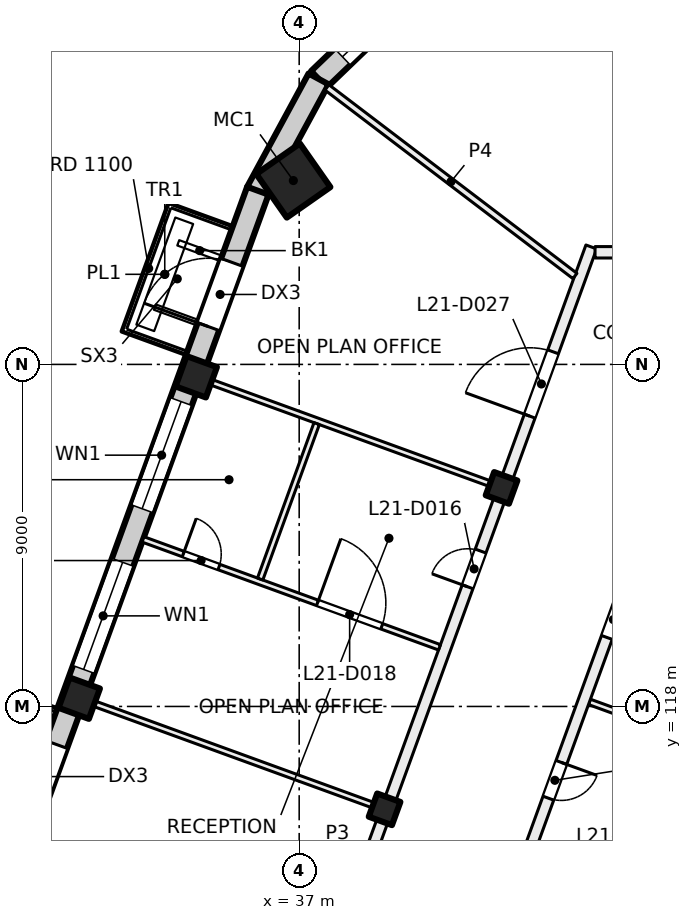
"""IFC4 building model, lengths in metres.
Left out: names, types, materials, properties, quantities, classifications, styles, units other than length and angle.
Written with IfcOpenShell. Run it as: python <this file> out.ifc"""

import sys

from ifc_helpers import new_model, si_unit, direction, frame, frame_2d, origin, origin_2d, place, context, subcontext, project, spatial, rectangle, hollow_rectangle, extrude, element, fill, save


model = new_model("IFC4")
c1 = context("Model", 3, precision=1e-05, world=origin(), true_north=direction((0.0, 1.0)))
c2 = subcontext(c1, "Body", "Model", "MODEL_VIEW")
j1 = project(units=[si_unit("LENGTHUNIT", "METRE"), si_unit("PLANEANGLEUNIT", "RADIAN")], contexts=[c1])
p1 = place(None, origin())
s1 = spatial("IfcSite", under=j1, at=p1, CompositionType="ELEMENT")
p2 = place(p1, origin())
s2 = spatial("IfcBuilding", under=s1, at=p2, CompositionType="ELEMENT")
p3 = place(p2, frame((0.0, 0.0, 93.0)))
s3 = spatial("IfcBuildingStorey", under=s2, at=p3, CompositionType="ELEMENT", Elevation=93.0)
p4 = place(p3, frame((36.846, 131.838, 0.0), z_axis=(0.0, 0.0, 1.0), x_axis=(0.573576436351, -0.819152044289, 0.0)))
e1 = element("IfcColumn", 1, at=p4, inside=s3, PredefinedType="COLUMN", context=c2, shape_type="SweptSolid", body=[
    extrude(hollow_rectangle(XDim=1.4, YDim=1.4, WallThickness=0.04, at=origin_2d()), origin(), (0.0, 0.0, 1.0), 4.0),
])
for number, where, z_axis, x_axis in (
    (2, (42.325, 123.751, 0.0), (0.0, 0.0, 1.0), (-0.342, -0.94, 0.0)),
    (3, (39.247, 115.293, 0.0), (0.0, 0.0, 1.0), (-0.342, -0.94, 0.0)),
):
    element("IfcColumn", number, at=place(p3, frame(where, z_axis=z_axis, x_axis=x_axis)), inside=s3, PredefinedType="COLUMN", context=c2, shape_type="SweptSolid", body=[
        extrude(rectangle(XDim=0.65, YDim=0.65, at=origin_2d()), origin(), (0.0, 0.0, 1.0), 4.0),
    ])
for number, where, z_axis, x_axis in (
    (4, (34.291, 126.675, 0.0), (0.0, 0.0, 1.0), (-0.342, -0.94, 0.0)),
    (5, (31.212, 118.218, 0.0), (0.0, 0.0, 1.0), (-0.342, -0.94, 0.0)),
):
    element("IfcColumn", number, at=place(p3, frame(where, z_axis=z_axis, x_axis=x_axis)), inside=s3, PredefinedType="COLUMN", context=c2, shape_type="SweptSolid", body=[
        extrude(rectangle(XDim=0.85, YDim=0.85, at=origin_2d()), origin(), (0.0, 0.0, 1.0), 4.0),
    ])
p5 = place(p3, frame((37.52, 134.501, 0.0), z_axis=(0.0, 0.0, 1.0), x_axis=(0.72115684486, 0.692771827596, 0.0)))
e6 = element("IfcWall", 6, at=p5, inside=s3, PredefinedType="SOLIDWALL", context=c2, shape_type="SweptSolid", body=[
    extrude(rectangle(XDim=3.303, YDim=0.6, at=frame_2d((1.651, 0.0))), origin(), (0.0, 0.0, 1.0), 3.625),
])
p6 = place(p5, frame((0.856, 0.0, 0.9)))
e7 = element("IfcOpeningElement", 7, at=p6, cuts=e6, PredefinedType="OPENING", context=c2, shape_type="SweptSolid", body=[
    extrude(rectangle(XDim=1.5, YDim=2.4, at=frame_2d((0.75, 1.2))), frame((0.0, 0.31, 0.0), z_axis=(0.0, -1.0, 0.0), x_axis=(1.0, 0.0, 0.0)), (0.0, 0.0, 1.0), 0.62),
])
p7 = place(p3, frame((35.895, 131.53, 0.0), z_axis=(0.0, 0.0, 1.0), x_axis=(0.476531180538, 0.879157570618, 0.0)))
e8 = element("IfcWall", 8, at=p7, inside=s3, PredefinedType="SOLIDWALL", context=c2, shape_type="SweptSolid", body=[
    extrude(rectangle(XDim=3.393, YDim=0.6, at=frame_2d((1.696, 0.0))), origin(), (0.0, 0.0, 1.0), 3.625),
])
p8 = place(p3, frame((24.666, 100.669, 0.0), z_axis=(0.0, 0.0, 1.0), x_axis=(0.34201964167, 0.939692803373, 0.0)))
e9 = element("IfcWall", 9, at=p8, inside=s3, PredefinedType="SOLIDWALL", context=c2, shape_type="SweptSolid", body=[
    extrude(rectangle(XDim=32.884, YDim=0.6, at=frame_2d((16.442, 0.0))), origin(), (0.0, 0.0, 1.0), 3.625),
])
p9 = place(p8, frame((1.48, 0.0, 0.9)))
e10 = element("IfcOpeningElement", 10, at=p9, cuts=e9, PredefinedType="OPENING", context=c2, shape_type="SweptSolid", body=[
    extrude(rectangle(XDim=3.0, YDim=2.4, at=frame_2d((1.5, 1.2))), frame((0.0, 0.31, 0.0), z_axis=(0.0, -1.0, 0.0), x_axis=(1.0, 0.0, 0.0)), (0.0, 0.0, 1.0), 0.62),
])
p10 = place(p8, frame((5.98, 0.0, 0.9)))
e11 = element("IfcOpeningElement", 11, at=p10, cuts=e9, PredefinedType="OPENING", context=c2, shape_type="SweptSolid", body=[
    extrude(rectangle(XDim=3.0, YDim=2.4, at=frame_2d((1.5, 1.2))), frame((0.0, 0.31, 0.0), z_axis=(0.0, -1.0, 0.0), x_axis=(1.0, 0.0, 0.0)), (0.0, 0.0, 1.0), 0.62),
])
p11 = place(p8, frame((10.48, 0.0, 0.9)))
e12 = element("IfcOpeningElement", 12, at=p11, cuts=e9, PredefinedType="OPENING", context=c2, shape_type="SweptSolid", body=[
    extrude(rectangle(XDim=3.0, YDim=2.4, at=frame_2d((1.5, 1.2))), frame((0.0, 0.31, 0.0), z_axis=(0.0, -1.0, 0.0), x_axis=(1.0, 0.0, 0.0)), (0.0, 0.0, 1.0), 0.62),
])
p12 = place(p8, frame((15.58, 0.0, 0.0)))
e13 = element("IfcOpeningElement", 13, at=p12, cuts=e9, PredefinedType="OPENING", context=c2, shape_type="SweptSolid", body=[
    extrude(rectangle(XDim=1.8, YDim=2.4, at=frame_2d((0.9, 1.2))), frame((0.0, 0.31, 0.0), z_axis=(0.0, -1.0, 0.0), x_axis=(1.0, 0.0, 0.0)), (0.0, 0.0, 1.0), 0.62),
])
p13 = place(p8, frame((19.48, 0.0, 0.9)))
e14 = element("IfcOpeningElement", 14, at=p13, cuts=e9, PredefinedType="OPENING", context=c2, shape_type="SweptSolid", body=[
    extrude(rectangle(XDim=3.0, YDim=2.4, at=frame_2d((1.5, 1.2))), frame((0.0, 0.31, 0.0), z_axis=(0.0, -1.0, 0.0), x_axis=(1.0, 0.0, 0.0)), (0.0, 0.0, 1.0), 0.62),
])
p14 = place(p8, frame((23.98, 0.0, 0.9)))
e15 = element("IfcOpeningElement", 15, at=p14, cuts=e9, PredefinedType="OPENING", context=c2, shape_type="SweptSolid", body=[
    extrude(rectangle(XDim=3.0, YDim=2.4, at=frame_2d((1.5, 1.2))), frame((0.0, 0.31, 0.0), z_axis=(0.0, -1.0, 0.0), x_axis=(1.0, 0.0, 0.0)), (0.0, 0.0, 1.0), 0.62),
])
p15 = place(p8, frame((29.08, 0.0, 0.0)))
e16 = element("IfcOpeningElement", 16, at=p15, cuts=e9, PredefinedType="OPENING", context=c2, shape_type="SweptSolid", body=[
    extrude(rectangle(XDim=1.8, YDim=2.4, at=frame_2d((0.9, 1.2))), frame((0.0, 0.31, 0.0), z_axis=(0.0, -1.0, 0.0), x_axis=(1.0, 0.0, 0.0)), (0.0, 0.0, 1.0), 0.62),
])
p16 = place(p3, frame((31.353, 118.166, 0.0), z_axis=(0.0, 0.0, 1.0), x_axis=(0.939687752599, -0.342033518263, 0.0)))
e17 = element("IfcWall", 17, at=p16, inside=s3, PredefinedType="PARTITIONING", context=c2, shape_type="SweptSolid", body=[
    extrude(rectangle(XDim=8.301, YDim=0.15, at=frame_2d((4.15, 0.0))), origin(), (0.0, 0.0, 1.0), 3.625),
])
p17 = place(p3, frame((32.881, 97.657, 0.0), z_axis=(0.0, 0.0, 1.0), x_axis=(0.342017360004, 0.939693633828, 0.0)))
e18 = element("IfcWall", 18, at=p17, inside=s3, PredefinedType="PARTITIONING", context=c2, shape_type="SweptSolid", body=[
    extrude(rectangle(XDim=34.516, YDim=0.3, at=frame_2d((17.258, 0.0))), origin(), (0.0, 0.0, 1.0), 3.625),
])
p18 = place(p17, frame((7.475, 0.0, 0.0)))
e19 = element("IfcOpeningElement", 19, at=p18, cuts=e18, PredefinedType="OPENING", context=c2, shape_type="SweptSolid", body=[
    extrude(rectangle(XDim=1.8, YDim=2.1, at=frame_2d((0.9, 1.05))), frame((0.0, 0.16, 0.0), z_axis=(0.0, -1.0, 0.0), x_axis=(1.0, 0.0, 0.0)), (0.0, 0.0, 1.0), 0.32),
])
p19 = place(p17, frame((25.0, 0.0, 0.0)))
e20 = element("IfcOpeningElement", 20, at=p19, cuts=e18, PredefinedType="OPENING", context=c2, shape_type="SweptSolid", body=[
    extrude(rectangle(XDim=1.0, YDim=2.1, at=frame_2d((0.5, 1.05))), frame((0.0, 0.16, 0.0), z_axis=(0.0, -1.0, 0.0), x_axis=(1.0, 0.0, 0.0)), (0.0, 0.0, 1.0), 0.32),
])
p20 = place(p17, frame((29.779, 0.0, 0.0)))
e21 = element("IfcOpeningElement", 21, at=p20, cuts=e18, PredefinedType="OPENING", context=c2, shape_type="SweptSolid", body=[
    extrude(rectangle(XDim=1.8, YDim=2.1, at=frame_2d((0.9, 1.05))), frame((0.0, 0.16, 0.0), z_axis=(0.0, -1.0, 0.0), x_axis=(1.0, 0.0, 0.0)), (0.0, 0.0, 1.0), 0.32),
])
p21 = place(p3, frame((32.892, 122.395, 0.0), z_axis=(0.0, 0.0, 1.0), x_axis=(0.939684311623, -0.3420429717, 0.0)))
e22 = element("IfcWall", 22, at=p21, inside=s3, PredefinedType="PARTITIONING", context=c2, shape_type="SweptSolid", body=[
    extrude(rectangle(XDim=8.301, YDim=0.15, at=frame_2d((4.15, 0.0))), origin(), (0.0, 0.0, 1.0), 3.625),
])
p22 = place(p21, frame((1.125, 0.0, 0.0)))
e23 = element("IfcOpeningElement", 23, at=p22, cuts=e22, PredefinedType="OPENING", context=c2, shape_type="SweptSolid", body=[
    extrude(rectangle(XDim=1.0, YDim=2.1, at=frame_2d((0.5, 1.05))), frame((0.0, 0.085, 0.0), z_axis=(0.0, -1.0, 0.0), x_axis=(1.0, 0.0, 0.0)), (0.0, 0.0, 1.0), 0.17),
])
p23 = place(p21, frame((4.884, 0.0, 0.0)))
e24 = element("IfcOpeningElement", 24, at=p23, cuts=e22, PredefinedType="OPENING", context=c2, shape_type="SweptSolid", body=[
    extrude(rectangle(XDim=1.8, YDim=2.1, at=frame_2d((0.9, 1.05))), frame((0.0, 0.085, 0.0), z_axis=(0.0, -1.0, 0.0), x_axis=(1.0, 0.0, 0.0)), (0.0, 0.0, 1.0), 0.17),
])
p24 = place(p3, frame((34.431, 126.624, 0.0), z_axis=(0.0, 0.0, 1.0), x_axis=(0.939687752599, -0.342033518263, 0.0)))
e25 = element("IfcWall", 25, at=p24, inside=s3, PredefinedType="PARTITIONING", context=c2, shape_type="SweptSolid", body=[
    extrude(rectangle(XDim=8.301, YDim=0.15, at=frame_2d((4.15, 0.0))), origin(), (0.0, 0.0, 1.0), 3.625),
])
p25 = place(p3, frame((37.46, 125.442, 0.0), z_axis=(0.0, 0.0, 1.0), x_axis=(-0.341783611499, -0.939778677621, 0.0)))
e26 = element("IfcWall", 26, at=p25, inside=s3, PredefinedType="PARTITIONING", context=c2, shape_type="SweptSolid", body=[
    extrude(rectangle(XDim=4.351, YDim=0.15, at=frame_2d((2.175, 0.0))), origin(), (0.0, 0.0, 1.0), 3.625),
])
p26 = place(p3, frame((44.256, 129.327, 0.0), z_axis=(0.0, 0.0, 1.0), x_axis=(-0.796040504107, 0.605243352563, 0.0)))
e27 = element("IfcWall", 27, at=p26, inside=s3, PredefinedType="PARTITIONING", context=c2, shape_type="SweptSolid", body=[
    extrude(rectangle(XDim=8.197, YDim=0.175, at=frame_2d((4.099, 0.0))), origin(), (0.0, 0.0, 1.0), 3.625),
])
p27 = place(p3, frame((44.639, 118.12, 0.0), z_axis=(0.0, 0.0, 1.0), x_axis=(0.939669707102, -0.342083091593, 0.0)))
e28 = element("IfcWall", 28, at=p27, inside=s3, PredefinedType="PARTITIONING", context=c2, shape_type="SweptSolid", body=[
    extrude(rectangle(XDim=8.589, YDim=0.15, at=frame_2d((4.295, 0.0))), origin(), (0.0, 0.0, 1.0), 3.625),
])
p28 = place(p3, frame((44.785, 129.95, 0.0), z_axis=(0.0, 0.0, 1.0), x_axis=(1.0, 0.0, 0.0)))
e29 = element("IfcWall", 29, at=p28, inside=s3, PredefinedType="PARTITIONING", context=c2, shape_type="SweptSolid", body=[
    extrude(rectangle(XDim=19.115, YDim=0.3, at=frame_2d((9.558, 0.0))), origin(), (0.0, 0.0, 1.0), 3.625),
])
p29 = place(p28, frame((15.615, 0.0, 0.0)))
e30 = element("IfcOpeningElement", 30, at=p29, cuts=e29, PredefinedType="OPENING", context=c2, shape_type="SweptSolid", body=[
    extrude(rectangle(XDim=1.2, YDim=2.1, at=frame_2d((0.6, 1.05))), frame((0.0, 0.16, 0.0), z_axis=(0.0, -1.0, 0.0), x_axis=(1.0, 0.0, 0.0)), (0.0, 0.0, 1.0), 0.32),
])
p30 = place(p28, frame((11.115, 0.0, 0.0)))
e31 = element("IfcOpeningElement", 31, at=p30, cuts=e29, PredefinedType="OPENING", context=c2, shape_type="SweptSolid", body=[
    extrude(rectangle(XDim=1.2, YDim=2.1, at=frame_2d((0.6, 1.05))), frame((0.0, 0.16, 0.0), z_axis=(0.0, -1.0, 0.0), x_axis=(1.0, 0.0, 0.0)), (0.0, 0.0, 1.0), 0.32),
])
p31 = place(p28, frame((4.123, 0.0, 0.0)))
e32 = element("IfcOpeningElement", 32, at=p31, cuts=e29, PredefinedType="OPENING", context=c2, shape_type="SweptSolid", body=[
    extrude(rectangle(XDim=1.2, YDim=2.1, at=frame_2d((0.6, 1.05))), frame((0.0, 0.16, 0.0), z_axis=(0.0, -1.0, 0.0), x_axis=(1.0, 0.0, 0.0)), (0.0, 0.0, 1.0), 0.32),
])
p32 = place(p3, frame((47.314, 125.909, 0.0), z_axis=(0.0, 0.0, 1.0), x_axis=(-0.342010770371, -0.939696032209, 0.0)))
e33 = element("IfcWall", 33, at=p32, inside=s3, PredefinedType="PARTITIONING", context=c2, shape_type="SweptSolid", body=[
    extrude(rectangle(XDim=31.485, YDim=0.3, at=frame_2d((15.742, 0.0))), origin(), (0.0, 0.0, 1.0), 3.625),
])
p33 = place(p32, frame((26.11, 0.0, 0.0)))
e34 = element("IfcOpeningElement", 34, at=p33, cuts=e33, PredefinedType="OPENING", context=c2, shape_type="SweptSolid", body=[
    extrude(rectangle(XDim=1.0, YDim=2.1, at=frame_2d((0.5, 1.05))), frame((0.0, 0.16, 0.0), z_axis=(0.0, -1.0, 0.0), x_axis=(1.0, 0.0, 0.0)), (0.0, 0.0, 1.0), 0.32),
])
p34 = place(p32, frame((15.485, 0.0, 0.0)))
e35 = element("IfcOpeningElement", 35, at=p34, cuts=e33, PredefinedType="OPENING", context=c2, shape_type="SweptSolid", body=[
    extrude(rectangle(XDim=1.0, YDim=2.1, at=frame_2d((0.5, 1.05))), frame((0.0, 0.16, 0.0), z_axis=(0.0, -1.0, 0.0), x_axis=(1.0, 0.0, 0.0)), (0.0, 0.0, 1.0), 0.32),
])
p35 = place(p32, frame((9.985, 0.0, 0.0)))
e36 = element("IfcOpeningElement", 36, at=p35, cuts=e33, PredefinedType="OPENING", context=c2, shape_type="SweptSolid", body=[
    extrude(rectangle(XDim=1.0, YDim=2.1, at=frame_2d((0.5, 1.05))), frame((0.0, 0.16, 0.0), z_axis=(0.0, -1.0, 0.0), x_axis=(1.0, 0.0, 0.0)), (0.0, 0.0, 1.0), 0.32),
])
p36 = place(p32, frame((5.484, 0.0, 0.0)))
e37 = element("IfcOpeningElement", 37, at=p36, cuts=e33, PredefinedType="OPENING", context=c2, shape_type="SweptSolid", body=[
    extrude(rectangle(XDim=1.0, YDim=2.1, at=frame_2d((0.5, 1.05))), frame((0.0, 0.16, 0.0), z_axis=(0.0, -1.0, 0.0), x_axis=(1.0, 0.0, 0.0)), (0.0, 0.0, 1.0), 0.32),
])
p37 = place(p6, origin())
e38 = element("IfcWindow", 38, at=p37, inside=s3, PartitioningType="SINGLE_PANEL", PredefinedType="WINDOW", context=c2, shape_type="SweptSolid", body=[
    extrude(rectangle(XDim=1.5, YDim=2.4, at=frame_2d((0.75, 1.2))), frame((0.0, 0.03, 0.0), z_axis=(0.0, -1.0, 0.0), x_axis=(1.0, 0.0, 0.0)), (0.0, 0.0, 1.0), 0.06),
])
fill(e7, e38)
p38 = place(p12, origin())
e39 = element("IfcDoor", 39, at=p38, inside=s3, OperationType="DOUBLE_DOOR_SINGLE_SWING", PredefinedType="DOOR", context=c2, shape_type="SweptSolid", body=[
    extrude(rectangle(XDim=1.8, YDim=2.4, at=frame_2d((0.9, 1.2))), frame((0.0, 0.025, 0.0), z_axis=(0.0, -1.0, 0.0), x_axis=(1.0, 0.0, 0.0)), (0.0, 0.0, 1.0), 0.05),
])
fill(e13, e39)
p39 = place(p13, origin())
e40 = element("IfcWindow", 40, at=p39, inside=s3, PartitioningType="SINGLE_PANEL", PredefinedType="WINDOW", context=c2, shape_type="SweptSolid", body=[
    extrude(rectangle(XDim=3.0, YDim=2.4, at=frame_2d((1.5, 1.2))), frame((0.0, 0.03, 0.0), z_axis=(0.0, -1.0, 0.0), x_axis=(1.0, 0.0, 0.0)), (0.0, 0.0, 1.0), 0.06),
])
fill(e14, e40)
p40 = place(p14, origin())
e41 = element("IfcWindow", 41, at=p40, inside=s3, PartitioningType="SINGLE_PANEL", PredefinedType="WINDOW", context=c2, shape_type="SweptSolid", body=[
    extrude(rectangle(XDim=3.0, YDim=2.4, at=frame_2d((1.5, 1.2))), frame((0.0, 0.03, 0.0), z_axis=(0.0, -1.0, 0.0), x_axis=(1.0, 0.0, 0.0)), (0.0, 0.0, 1.0), 0.06),
])
fill(e15, e41)
p41 = place(p15, origin())
e42 = element("IfcDoor", 42, at=p41, inside=s3, OperationType="DOUBLE_DOOR_SINGLE_SWING", PredefinedType="DOOR", context=c2, shape_type="SweptSolid", body=[
    extrude(rectangle(XDim=1.8, YDim=2.4, at=frame_2d((0.9, 1.2))), frame((0.0, 0.025, 0.0), z_axis=(0.0, -1.0, 0.0), x_axis=(1.0, 0.0, 0.0)), (0.0, 0.0, 1.0), 0.05),
])
fill(e16, e42)
p42 = place(p19, origin())
e43 = element("IfcDoor", 43, at=p42, inside=s3, OperationType="SINGLE_SWING_LEFT", PredefinedType="DOOR", context=c2, shape_type="SweptSolid", body=[
    extrude(rectangle(XDim=1.0, YDim=2.1, at=frame_2d((0.5, 1.05))), frame((0.0, 0.025, 0.0), z_axis=(0.0, -1.0, 0.0), x_axis=(1.0, 0.0, 0.0)), (0.0, 0.0, 1.0), 0.05),
])
fill(e20, e43)
p43 = place(p22, origin())
e44 = element("IfcDoor", 44, at=p43, inside=s3, OperationType="SINGLE_SWING_RIGHT", PredefinedType="DOOR", context=c2, shape_type="SweptSolid", body=[
    extrude(rectangle(XDim=1.0, YDim=2.1, at=frame_2d((0.5, 1.05))), frame((0.0, 0.025, 0.0), z_axis=(0.0, -1.0, 0.0), x_axis=(1.0, 0.0, 0.0)), (0.0, 0.0, 1.0), 0.05),
])
fill(e23, e44)
p44 = place(p23, origin())
e45 = element("IfcDoor", 45, at=p44, inside=s3, OperationType="DOUBLE_DOOR_SINGLE_SWING", PredefinedType="DOOR", context=c2, shape_type="SweptSolid", body=[
    extrude(rectangle(XDim=1.8, YDim=2.1, at=frame_2d((0.9, 1.05))), frame((0.0, 0.025, 0.0), z_axis=(0.0, -1.0, 0.0), x_axis=(1.0, 0.0, 0.0)), (0.0, 0.0, 1.0), 0.05),
])
fill(e24, e45)
p45 = place(p35, origin())
e46 = element("IfcDoor", 46, at=p45, inside=s3, OperationType="SINGLE_SWING_LEFT", PredefinedType="DOOR", context=c2, shape_type="SweptSolid", body=[
    extrude(rectangle(XDim=1.0, YDim=2.1, at=frame_2d((0.5, 1.05))), frame((0.0, 0.025, 0.0), z_axis=(0.0, -1.0, 0.0), x_axis=(1.0, 0.0, 0.0)), (0.0, 0.0, 1.0), 0.05),
])
fill(e36, e46)
p46 = place(p36, origin())
e47 = element("IfcDoor", 47, at=p46, inside=s3, OperationType="SINGLE_SWING_LEFT", PredefinedType="DOOR", context=c2, shape_type="SweptSolid", body=[
    extrude(rectangle(XDim=1.0, YDim=2.1, at=frame_2d((0.5, 1.05))), frame((0.0, 0.025, 0.0), z_axis=(0.0, -1.0, 0.0), x_axis=(1.0, 0.0, 0.0)), (0.0, 0.0, 1.0), 0.05),
])
fill(e37, e47)
p47 = place(p20, origin())
e48 = element("IfcDoor", 48, at=p47, inside=s3, OperationType="DOUBLE_DOOR_SINGLE_SWING", PredefinedType="DOOR", context=c2, shape_type="SweptSolid", body=[
    extrude(rectangle(XDim=1.8, YDim=2.1, at=frame_2d((0.9, 1.05))), frame((0.0, 0.025, 0.0), z_axis=(0.0, -1.0, 0.0), x_axis=(1.0, 0.0, 0.0)), (0.0, 0.0, 1.0), 0.05),
])
fill(e21, e48)
save(model, sys.argv[1])
